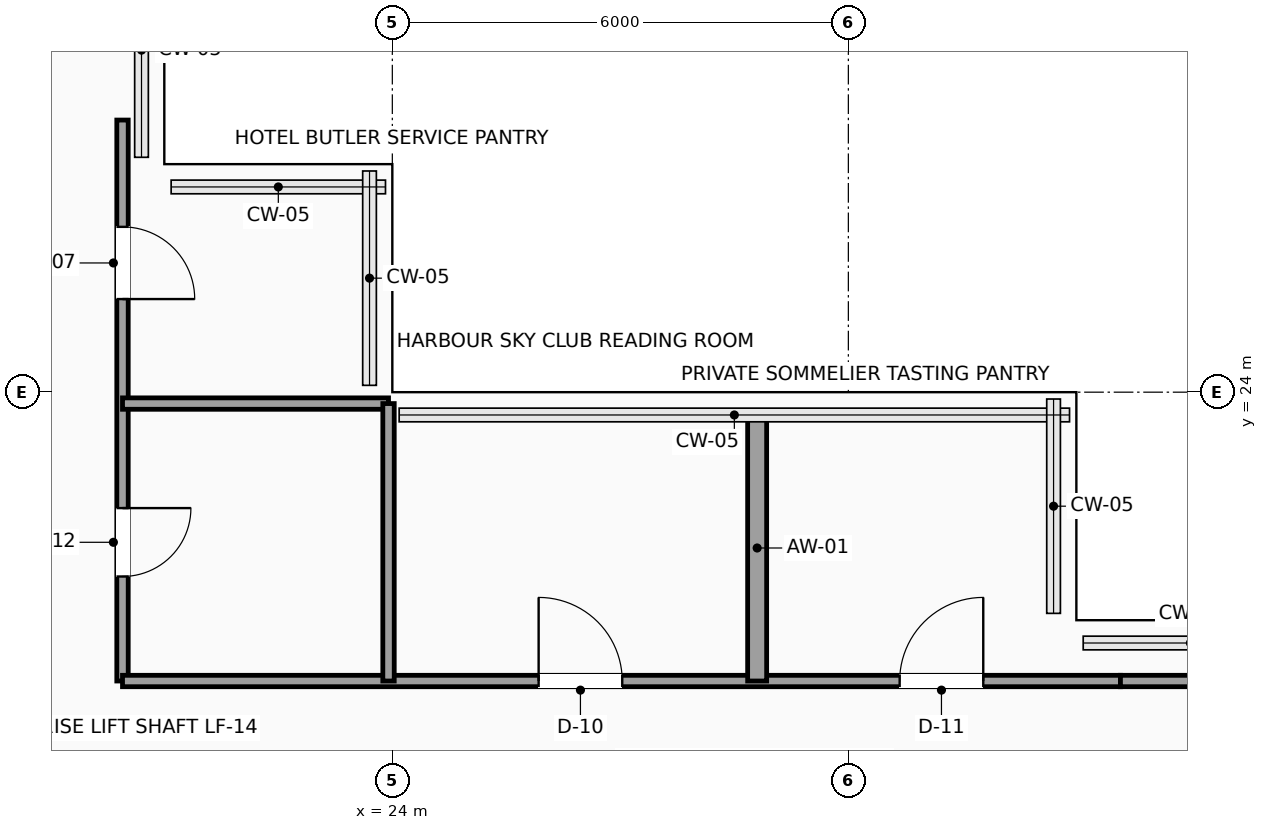
"""IFC4 building model, lengths in metres.
Left out: names, types, materials, properties, quantities, classifications, styles, units other than length and angle.
Written with IfcOpenShell. Run it as: python <this file> out.ifc"""

import sys

from ifc_helpers import new_model, si_unit, direction, frame, frame_2d, origin, place, context, subcontext, project, spatial, rectangle, extrude, element, fill, save


model = new_model("IFC4")
c1 = context("Model", 3, precision=1e-05, world=origin(), true_north=direction((0.0, 1.0)))
c2 = subcontext(c1, "Body", "Model", "MODEL_VIEW")
j1 = project(units=[si_unit("LENGTHUNIT", "METRE"), si_unit("PLANEANGLEUNIT", "RADIAN")], contexts=[c1])
p1 = place(None, origin())
s1 = spatial("IfcSite", under=j1, at=p1, CompositionType="ELEMENT")
p2 = place(p1, origin())
s2 = spatial("IfcBuilding", under=s1, at=p2, CompositionType="ELEMENT")
p3 = place(p2, frame((0.0, 0.0, 285.2)))
s3 = spatial("IfcBuildingStorey", under=s2, at=p3, CompositionType="ELEMENT", Elevation=285.2)
p4 = place(p3, frame((20.45, 27.58, 0.0), z_axis=(0.0, 0.0, 1.0), x_axis=(0.0, -1.0, 0.0)))
e1 = element("IfcWall", 1, at=p4, inside=s3, PredefinedType="PARTITIONING", context=c2, shape_type="SweptSolid", body=[
    extrude(rectangle(XDim=7.38, YDim=0.15, at=frame_2d((3.69, 0.0))), origin(), (0.0, 0.0, 1.0), 3.3),
])
p5 = place(p4, frame((5.105, 0.0, 0.0)))
e2 = element("IfcOpeningElement", 2, at=p5, cuts=e1, PredefinedType="OPENING", context=c2, shape_type="SweptSolid", body=[
    extrude(rectangle(XDim=0.9, YDim=2.1, at=frame_2d((0.45, 1.05))), frame((0.0, 0.085, 0.0), z_axis=(0.0, -1.0, 0.0), x_axis=(1.0, 0.0, 0.0)), (0.0, 0.0, 1.0), 0.17),
])
p6 = place(p4, frame((1.405, 0.0, 0.0)))
e3 = element("IfcOpeningElement", 3, at=p6, cuts=e1, PredefinedType="OPENING", context=c2, shape_type="SweptSolid", body=[
    extrude(rectangle(XDim=0.95, YDim=2.15, at=frame_2d((0.475, 1.075))), frame((0.0, 0.085, 0.0), z_axis=(0.0, -1.0, 0.0), x_axis=(1.0, 0.0, 0.0)), (0.0, 0.0, 1.0), 0.17),
])
p7 = place(p3, frame((20.45, 20.2, 0.0), z_axis=(0.0, 0.0, 1.0), x_axis=(1.0, 0.0, 0.0)))
e4 = element("IfcWall", 4, at=p7, inside=s3, PredefinedType="PARTITIONING", context=c2, shape_type="SweptSolid", body=[
    extrude(rectangle(XDim=13.13, YDim=0.15, at=frame_2d((6.565, 0.0))), origin(), (0.0, 0.0, 1.0), 3.3),
])
p8 = place(p7, frame((5.475, 0.0, 0.0)))
e5 = element("IfcOpeningElement", 5, at=p8, cuts=e4, PredefinedType="OPENING", context=c2, shape_type="SweptSolid", body=[
    extrude(rectangle(XDim=1.1, YDim=2.25, at=frame_2d((0.55, 1.125))), frame((0.0, 0.085, 0.0), z_axis=(0.0, -1.0, 0.0), x_axis=(1.0, 0.0, 0.0)), (0.0, 0.0, 1.0), 0.17),
])
p9 = place(p7, frame((10.225, 0.0, 0.0)))
e6 = element("IfcOpeningElement", 6, at=p9, cuts=e4, PredefinedType="OPENING", context=c2, shape_type="SweptSolid", body=[
    extrude(rectangle(XDim=1.1, YDim=2.25, at=frame_2d((0.55, 1.125))), frame((0.0, 0.085, 0.0), z_axis=(0.0, -1.0, 0.0), x_axis=(1.0, 0.0, 0.0)), (0.0, 0.0, 1.0), 0.17),
])
p10 = place(p3, frame((33.58, 20.2, 0.0), z_axis=(0.0, 0.0, 1.0), x_axis=(1.0, 0.0, 0.0)))
e7 = element("IfcWall", 7, at=p10, inside=s3, PredefinedType="PARTITIONING", context=c2, shape_type="SweptSolid", body=[
    extrude(rectangle(XDim=2.12, YDim=0.15, at=frame_2d((1.06, 0.0))), origin(), (0.0, 0.0, 1.0), 3.3),
])
p11 = place(p3, frame((20.45, 23.85, 0.0), z_axis=(0.0, 0.0, 1.0), x_axis=(1.0, 0.0, 0.0)))
e8 = element("IfcWall", 8, at=p11, inside=s3, PredefinedType="PARTITIONING", context=c2, shape_type="SweptSolid", body=[
    extrude(rectangle(XDim=3.5, YDim=0.15, at=frame_2d((1.75, 0.0))), origin(), (0.0, 0.0, 1.0), 3.3),
])
p12 = place(p3, frame((23.95, 20.2, 0.0), z_axis=(0.0, 0.0, 1.0), x_axis=(0.0, 1.0, 0.0)))
e9 = element("IfcWall", 9, at=p12, inside=s3, PredefinedType="PARTITIONING", context=c2, shape_type="SweptSolid", body=[
    extrude(rectangle(XDim=3.65, YDim=0.15, at=frame_2d((1.825, 0.0))), origin(), (0.0, 0.0, 1.0), 3.3),
])
p13 = place(p3, frame((28.8, 20.2, 0.0), z_axis=(0.0, 0.0, 1.0), x_axis=(0.0, 1.0, 0.0)))
e10 = element("IfcWall", 10, at=p13, inside=s3, PredefinedType="PARTITIONING", context=c2, shape_type="SweptSolid", body=[
    extrude(rectangle(XDim=3.5, YDim=0.25, at=frame_2d((1.75, 0.0))), origin(), (0.0, 0.0, 1.0), 3.3),
])
p14 = place(p5, origin())
e11 = element("IfcDoor", 11, at=p14, inside=s3, OperationType="SINGLE_SWING_LEFT", PredefinedType="DOOR", context=c2, shape_type="SweptSolid", body=[
    extrude(rectangle(XDim=0.9, YDim=2.1, at=frame_2d((0.45, 1.05))), frame((0.0, 0.025, 0.0), z_axis=(0.0, -1.0, 0.0), x_axis=(1.0, 0.0, 0.0)), (0.0, 0.0, 1.0), 0.05),
])
fill(e2, e11)
p15 = place(p6, origin())
e12 = element("IfcDoor", 12, at=p15, inside=s3, OperationType="SINGLE_SWING_RIGHT", PredefinedType="DOOR", context=c2, shape_type="SweptSolid", body=[
    extrude(rectangle(XDim=0.95, YDim=2.15, at=frame_2d((0.475, 1.075))), frame((0.0, 0.025, 0.0), z_axis=(0.0, -1.0, 0.0), x_axis=(1.0, 0.0, 0.0)), (0.0, 0.0, 1.0), 0.05),
])
fill(e3, e12)
p16 = place(p8, origin())
e13 = element("IfcDoor", 13, at=p16, inside=s3, OperationType="SINGLE_SWING_LEFT", PredefinedType="DOOR", context=c2, shape_type="SweptSolid", body=[
    extrude(rectangle(XDim=1.1, YDim=2.25, at=frame_2d((0.55, 1.125))), frame((0.0, 0.025, 0.0), z_axis=(0.0, -1.0, 0.0), x_axis=(1.0, 0.0, 0.0)), (0.0, 0.0, 1.0), 0.05),
])
fill(e5, e13)
p17 = place(p9, origin())
e14 = element("IfcDoor", 14, at=p17, inside=s3, OperationType="SINGLE_SWING_RIGHT", PredefinedType="DOOR", context=c2, shape_type="SweptSolid", body=[
    extrude(rectangle(XDim=1.1, YDim=2.25, at=frame_2d((0.55, 1.125))), frame((0.0, 0.025, 0.0), z_axis=(0.0, -1.0, 0.0), x_axis=(1.0, 0.0, 0.0)), (0.0, 0.0, 1.0), 0.05),
])
fill(e6, e14)
save(model, sys.argv[1])
